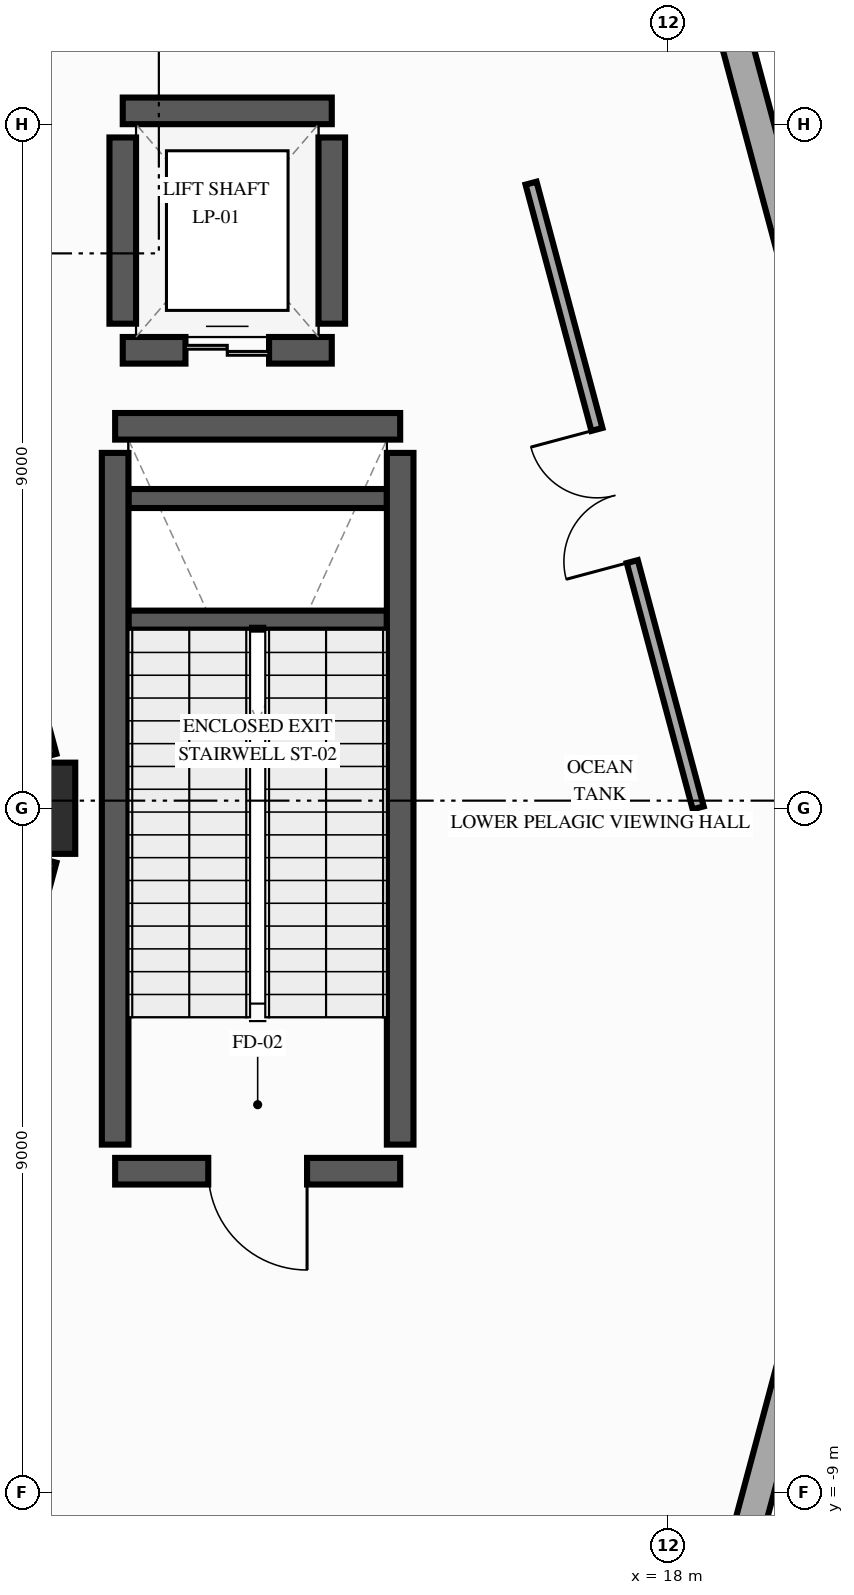
"""IFC4 building model, lengths in metres.
Left out: names, types, materials, properties, quantities, classifications, styles, units other than length and angle.
Written with IfcOpenShell. Run it as: python <this file> out.ifc"""

import sys

from ifc_helpers import new_model, si_unit, direction, frame, frame_2d, origin, origin_2d, place, context, subcontext, project, spatial, rectangle, extrude, element, fill, save


model = new_model("IFC4")
c1 = context("Model", 3, precision=1e-05, world=origin(), true_north=direction((0.0, 1.0)))
c2 = subcontext(c1, "Body", "Model", "MODEL_VIEW")
j1 = project(units=[si_unit("LENGTHUNIT", "METRE"), si_unit("PLANEANGLEUNIT", "RADIAN")], contexts=[c1])
p1 = place(None, origin())
s1 = spatial("IfcSite", under=j1, at=p1, CompositionType="ELEMENT")
p2 = place(p1, origin())
s2 = spatial("IfcBuilding", under=s1, at=p2, CompositionType="ELEMENT")
p3 = place(p2, origin())
s3 = spatial("IfcBuildingStorey", under=s2, at=p3, CompositionType="ELEMENT", Elevation=0.0)
p4 = place(p3, frame((9.6, 0.0, 0.0), z_axis=(0.0, 0.0, 1.0), x_axis=(1.0, 0.0, 0.0)))
e1 = element("IfcColumn", 1, at=p4, inside=s3, PredefinedType="COLUMN", context=c2, shape_type="SweptSolid", body=[
    extrude(rectangle(XDim=1.2, YDim=1.2, at=origin_2d()), origin(), (0.0, 0.0, 1.0), 5.4),
])
for number, where, z_axis, x_axis in (
    (2, (9.445, 0.58, 0.0), (0.0, 0.0, 1.0), (-0.259, 0.966, 0.0)),
    (3, (8.469, -4.22, 0.0), (0.0, 0.0, 1.0), (0.259, 0.966, 0.0)),
):
    element("IfcWall", number, at=place(p3, frame(where, z_axis=z_axis, x_axis=x_axis)), inside=s3, PredefinedType="SHEAR", context=c2, shape_type="SweptSolid", body=[
        extrude(rectangle(XDim=3.769, YDim=1.05, at=frame_2d((1.884, 0.0))), origin(), (0.0, 0.0, 1.0), 5.12),
    ])
p5 = place(p3, frame((18.886, 10.129, 0.0), z_axis=(0.0, 0.0, 1.0), x_axis=(0.258787599316, -0.965934251614, 0.0)))
e4 = element("IfcWall", 4, at=p5, inside=s3, PredefinedType="SOLIDWALL", context=c2, shape_type="SweptSolid", body=[
    extrude(rectangle(XDim=9.792, YDim=0.4, at=frame_2d((4.896, 0.0))), origin(), (0.0, 0.0, 1.0), 4.255),
])
p6 = place(p5, frame((3.296, 0.0, 0.0)))
e5 = element("IfcOpeningElement", 5, at=p6, cuts=e4, PredefinedType="OPENING", context=c2, shape_type="SweptSolid", body=[
    extrude(rectangle(XDim=3.2, YDim=3.0, at=frame_2d((1.6, 1.5))), frame((0.0, 0.21, 0.0), z_axis=(0.0, -1.0, 0.0), x_axis=(1.0, 0.0, 0.0)), (0.0, 0.0, 1.0), 0.42),
])
p7 = place(p3, frame((21.42, -0.671, 0.0), z_axis=(0.0, 0.0, 1.0), x_axis=(-0.258787599316, -0.965934251614, 0.0)))
e6 = element("IfcWall", 6, at=p7, inside=s3, PredefinedType="SOLIDWALL", context=c2, shape_type="SweptSolid", body=[
    extrude(rectangle(XDim=9.792, YDim=0.4, at=frame_2d((4.896, 0.0))), origin(), (0.0, 0.0, 1.0), 4.255),
])
p8 = place(p7, frame((4.371, 0.0, 0.9)))
e7 = element("IfcOpeningElement", 7, at=p8, cuts=e6, PredefinedType="OPENING", context=c2, shape_type="SweptSolid", body=[
    extrude(rectangle(XDim=1.05, YDim=2.0, at=frame_2d((0.525, 1.0))), frame((0.0, 0.21, 0.0), z_axis=(0.0, -1.0, 0.0), x_axis=(1.0, 0.0, 0.0)), (0.0, 0.0, 1.0), 0.42),
])
for number, where, z_axis, x_axis in (
    (8, (10.9, 2.475, 0.0), (0.0, 0.0, 1.0), (1.0, 0.0, 0.0)),
    (9, (10.9, 4.075, 0.0), (0.0, 0.0, 1.0), (1.0, 0.0, 0.0)),
):
    element("IfcWall", number, at=place(p3, frame(where, z_axis=z_axis, x_axis=x_axis)), inside=s3, PredefinedType="SHEAR", context=c2, shape_type="SweptSolid", body=[
        extrude(rectangle(XDim=3.4, YDim=0.25, at=frame_2d((1.7, 0.0))), origin(), (0.0, 0.0, 1.0), 2.5),
    ])
p9 = place(p3, frame((14.475, -4.775, 0.0), z_axis=(0.0, 0.0, 1.0), x_axis=(-1.0, 0.0, 0.0)))
e10 = element("IfcWall", 10, at=p9, inside=s3, PredefinedType="SHEAR", context=c2, shape_type="SweptSolid", body=[
    extrude(rectangle(XDim=3.75, YDim=0.35, at=frame_2d((1.875, 0.0))), origin(), (0.0, 0.0, 1.0), 5.12),
])
p10 = place(p9, frame((1.225, 0.0, 0.0)))
e11 = element("IfcOpeningElement", 11, at=p10, cuts=e10, PredefinedType="OPENING", context=c2, shape_type="SweptSolid", body=[
    extrude(rectangle(XDim=1.3, YDim=2.2, at=frame_2d((0.65, 1.1))), frame((0.0, 0.185, 0.0), z_axis=(0.0, -1.0, 0.0), x_axis=(1.0, 0.0, 0.0)), (0.0, 0.0, 1.0), 0.37),
])
p11 = place(p3, frame((10.725, 5.025, 0.0), z_axis=(0.0, 0.0, 1.0), x_axis=(1.0, 0.0, 0.0)))
e12 = element("IfcWall", 12, at=p11, inside=s3, PredefinedType="SHEAR", context=c2, shape_type="SweptSolid", body=[
    extrude(rectangle(XDim=3.75, YDim=0.35, at=frame_2d((1.875, 0.0))), origin(), (0.0, 0.0, 1.0), 5.12),
])
for number, where, z_axis, x_axis in (
    (13, (10.725, -4.425, 0.0), (0.0, 0.0, 1.0), (0.0, 1.0, 0.0)),
    (14, (14.475, -4.425, 0.0), (0.0, 0.0, 1.0), (0.0, 1.0, 0.0)),
):
    element("IfcWall", number, at=place(p3, frame(where, z_axis=z_axis, x_axis=x_axis)), inside=s3, PredefinedType="SHEAR", context=c2, shape_type="SweptSolid", body=[
        extrude(rectangle(XDim=9.1, YDim=0.35, at=frame_2d((4.55, 0.0))), origin(), (0.0, 0.0, 1.0), 5.12),
    ])
p12 = place(p3, frame((10.825, 6.025, 0.0), z_axis=(0.0, 0.0, 1.0), x_axis=(1.0, 0.0, 0.0)))
e15 = element("IfcWall", 15, at=p12, inside=s3, PredefinedType="SHEAR", context=c2, shape_type="SweptSolid", body=[
    extrude(rectangle(XDim=2.75, YDim=0.35, at=frame_2d((1.375, 0.0))), origin(), (0.0, 0.0, 1.0), 5.12),
])
p13 = place(p12, frame((0.825, 0.0, 0.0)))
e16 = element("IfcOpeningElement", 16, at=p13, cuts=e15, PredefinedType="OPENING", context=c2, shape_type="SweptSolid", body=[
    extrude(rectangle(XDim=1.1, YDim=2.2, at=frame_2d((0.55, 1.1))), frame((0.0, 0.185, 0.0), z_axis=(0.0, -1.0, 0.0), x_axis=(1.0, 0.0, 0.0)), (0.0, 0.0, 1.0), 0.37),
])
p14 = place(p3, frame((13.575, 9.175, 0.0), z_axis=(0.0, 0.0, 1.0), x_axis=(-1.0, 0.0, 0.0)))
e17 = element("IfcWall", 17, at=p14, inside=s3, PredefinedType="SHEAR", context=c2, shape_type="SweptSolid", body=[
    extrude(rectangle(XDim=2.75, YDim=0.35, at=frame_2d((1.375, 0.0))), origin(), (0.0, 0.0, 1.0), 5.12),
])
for number, where, z_axis, x_axis in (
    (18, (10.825, 6.375, 0.0), (0.0, 0.0, 1.0), (0.0, 1.0, 0.0)),
    (19, (13.575, 6.375, 0.0), (0.0, 0.0, 1.0), (0.0, 1.0, 0.0)),
):
    element("IfcWall", number, at=place(p3, frame(where, z_axis=z_axis, x_axis=x_axis)), inside=s3, PredefinedType="SHEAR", context=c2, shape_type="SweptSolid", body=[
        extrude(rectangle(XDim=2.45, YDim=0.35, at=frame_2d((1.225, 0.0))), origin(), (0.0, 0.0, 1.0), 5.12),
    ])
p15 = place(p3, frame((18.396, 0.005, 0.0), z_axis=(0.0, 0.0, 1.0), x_axis=(-0.258450171781, 0.966024590115, 0.0)))
e20 = element("IfcWall", 20, at=p15, inside=s3, PredefinedType="PARTITIONING", context=c2, shape_type="SweptSolid", body=[
    extrude(rectangle(XDim=8.508, YDim=0.15, at=frame_2d((4.254, 0.0))), origin(), (0.0, 0.0, 1.0), 5.05),
])
p16 = place(p15, frame((3.354, 0.0, 0.0)))
e21 = element("IfcOpeningElement", 21, at=p16, cuts=e20, PredefinedType="OPENING", context=c2, shape_type="SweptSolid", body=[
    extrude(rectangle(XDim=1.8, YDim=2.3, at=frame_2d((0.9, 1.15))), frame((0.0, 0.085, 0.0), z_axis=(0.0, -1.0, 0.0), x_axis=(1.0, 0.0, 0.0)), (0.0, 0.0, 1.0), 0.17),
])
p17 = place(p10, origin())
e22 = element("IfcDoor", 22, at=p17, inside=s3, OperationType="SINGLE_SWING_LEFT", PredefinedType="DOOR", context=c2, shape_type="SweptSolid", body=[
    extrude(rectangle(XDim=1.3, YDim=2.2, at=frame_2d((0.65, 1.1))), frame((0.0, 0.025, 0.0), z_axis=(0.0, -1.0, 0.0), x_axis=(1.0, 0.0, 0.0)), (0.0, 0.0, 1.0), 0.05),
])
fill(e11, e22)
p18 = place(p13, origin())
e23 = element("IfcDoor", 23, at=p18, inside=s3, OperationType="DOUBLE_DOOR_SLIDING", PredefinedType="DOOR", context=c2, shape_type="SweptSolid", body=[
    extrude(rectangle(XDim=1.1, YDim=2.2, at=frame_2d((0.55, 1.1))), frame((0.0, 0.025, 0.0), z_axis=(0.0, -1.0, 0.0), x_axis=(1.0, 0.0, 0.0)), (0.0, 0.0, 1.0), 0.05),
])
fill(e16, e23)
p19 = place(p16, origin())
e24 = element("IfcDoor", 24, at=p19, inside=s3, OperationType="DOUBLE_DOOR_SINGLE_SWING", PredefinedType="DOOR", context=c2, shape_type="SweptSolid", body=[
    extrude(rectangle(XDim=1.8, YDim=2.3, at=frame_2d((0.9, 1.15))), frame((0.0, 0.025, 0.0), z_axis=(0.0, -1.0, 0.0), x_axis=(1.0, 0.0, 0.0)), (0.0, 0.0, 1.0), 0.05),
])
fill(e21, e24)
save(model, sys.argv[1])
